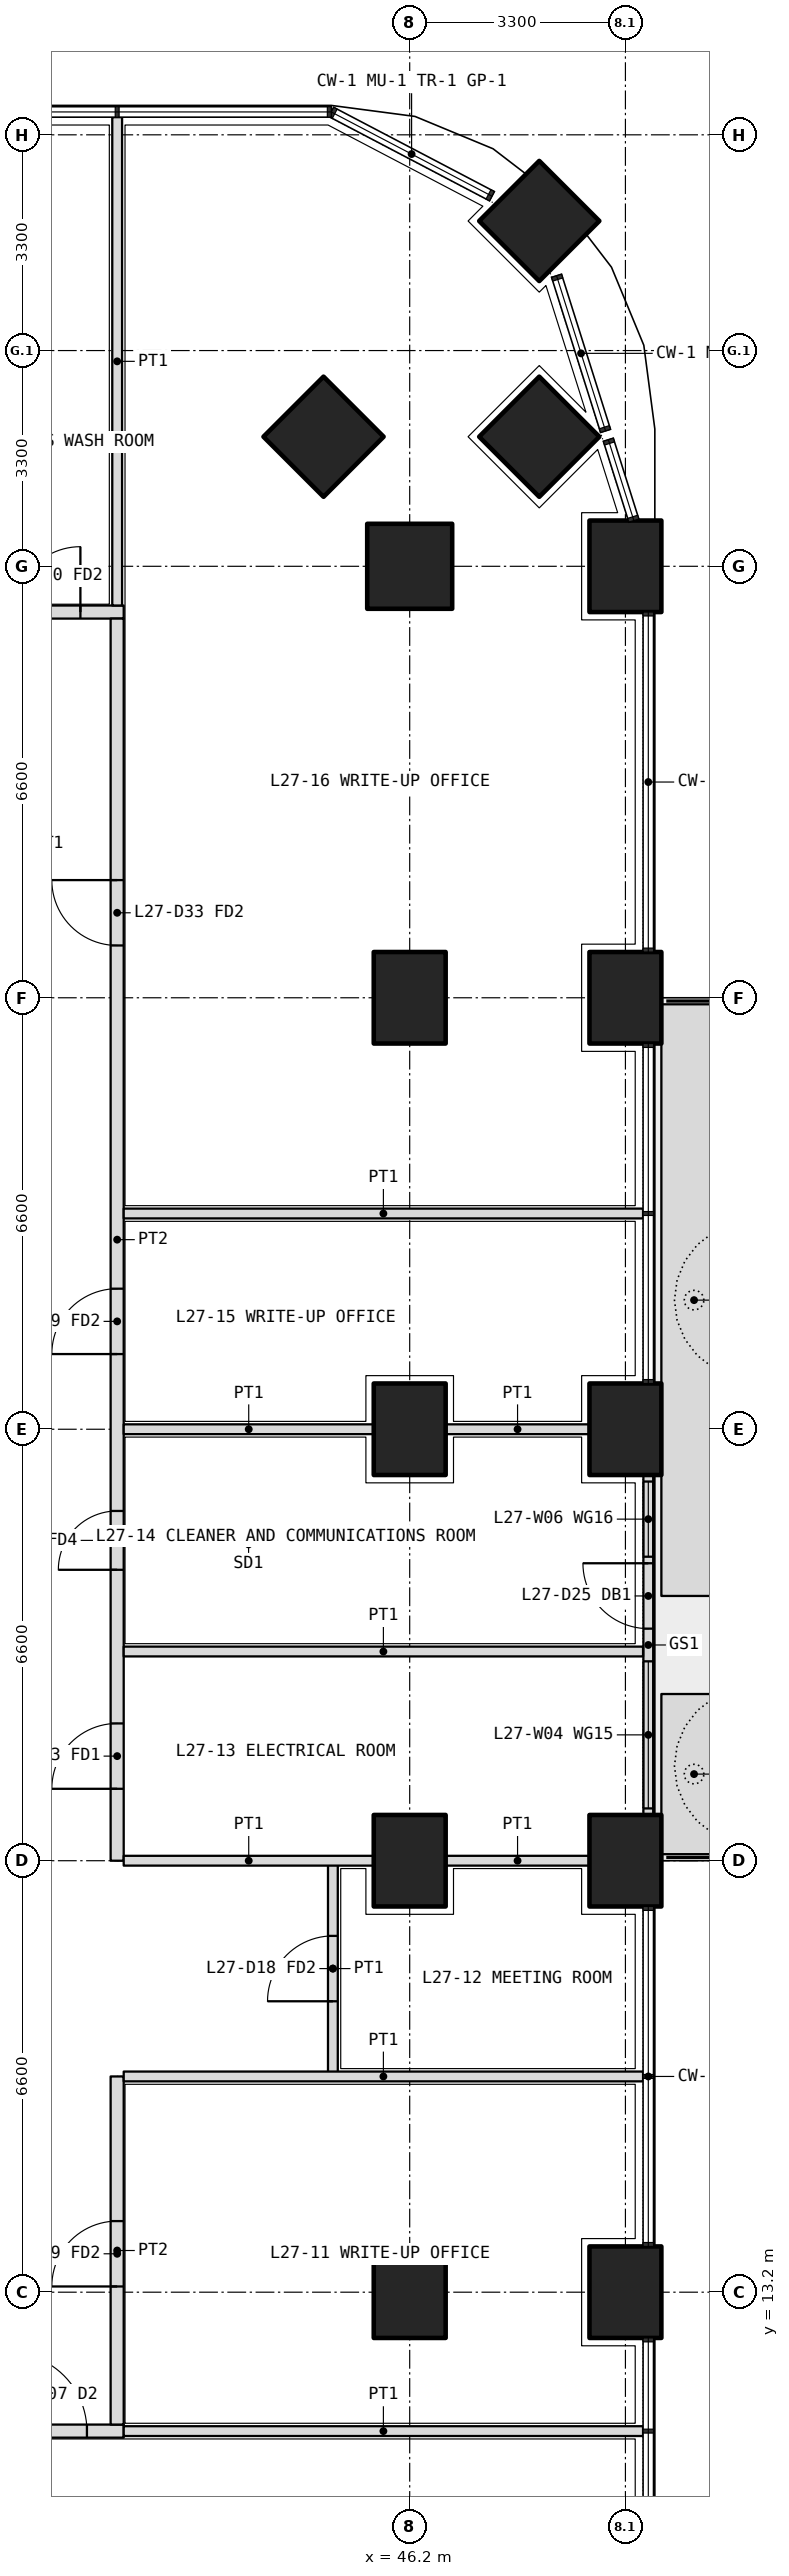
"""IFC4 building model, lengths in metres.
Left out: names, types, materials, properties, quantities, classifications, styles, units other than length and angle.
Written with IfcOpenShell. Run it as: python <this file> out.ifc"""

import sys

from ifc_helpers import new_model, si_unit, direction, frame, frame_2d, origin, origin_2d, place, context, subcontext, project, spatial, polyline, rectangle, outline, extrude, element, fill, save


model = new_model("IFC4")
c1 = context("Model", 3, precision=1e-05, world=origin(), true_north=direction((0.0, 1.0)))
c2 = subcontext(c1, "Body", "Model", "MODEL_VIEW")
j1 = project(units=[si_unit("LENGTHUNIT", "METRE"), si_unit("PLANEANGLEUNIT", "RADIAN")], contexts=[c1])
p1 = place(None, origin())
s1 = spatial("IfcSite", under=j1, at=p1, CompositionType="ELEMENT")
p2 = place(p1, origin())
s2 = spatial("IfcBuilding", under=s1, at=p2, CompositionType="ELEMENT")
p3 = place(p2, frame((0.0, 0.0, 120.0)))
s3 = spatial("IfcBuildingStorey", under=s2, at=p3, CompositionType="ELEMENT", Elevation=120.0)
p4 = place(p3, frame((48.182, 44.882, 0.0), z_axis=(0.0, 0.0, 1.0), x_axis=(0.707106781187, 0.707106781187, 0.0)))
e1 = element("IfcColumn", 1, at=p4, inside=s3, PredefinedType="COLUMN", context=c2, shape_type="SweptSolid", body=[
    extrude(rectangle(XDim=1.3, YDim=1.3, at=origin_2d()), origin(), (0.0, 0.0, 1.0), 4.2),
])
for number, where, z_axis, x_axis in (
    (2, (49.5, 13.2, 0.0), (0.0, 0.0, 1.0), (0.0, 1.0, 0.0)),
    (3, (49.5, 19.8, 0.0), (0.0, 0.0, 1.0), (0.0, 1.0, 0.0)),
    (4, (49.5, 26.4, 0.0), (0.0, 0.0, 1.0), (0.0, 1.0, 0.0)),
    (5, (49.5, 33.0, 0.0), (0.0, 0.0, 1.0), (0.0, 1.0, 0.0)),
    (6, (49.5, 39.6, 0.0), (0.0, 0.0, 1.0), (0.0, 1.0, 0.0)),
):
    element("IfcColumn", number, at=place(p3, frame(where, z_axis=z_axis, x_axis=x_axis)), inside=s3, PredefinedType="COLUMN", context=c2, shape_type="SweptSolid", body=[
        extrude(rectangle(XDim=1.4, YDim=1.1, at=origin_2d()), origin(), (0.0, 0.0, 1.0), 4.2),
    ])
for number, where, z_axis, x_axis in (
    (7, (46.2, 39.6, 0.0), (0.0, 0.0, 1.0), (1.0, 0.0, 0.0)),
    (8, (48.182, 41.582, 0.0), (0.0, 0.0, 1.0), (0.707, 0.707, 0.0)),
    (9, (44.882, 41.582, 0.0), (0.0, 0.0, 1.0), (0.707, 0.707, 0.0)),
):
    element("IfcColumn", number, at=place(p3, frame(where, z_axis=z_axis, x_axis=x_axis)), inside=s3, PredefinedType="COLUMN", context=c2, shape_type="SweptSolid", body=[
        extrude(rectangle(XDim=1.3, YDim=1.3, at=origin_2d()), origin(), (0.0, 0.0, 1.0), 4.2),
    ])
for number, where, z_axis, x_axis in (
    (10, (46.2, 13.2, 0.0), (0.0, 0.0, 1.0), (0.0, 1.0, 0.0)),
    (11, (46.2, 19.8, 0.0), (0.0, 0.0, 1.0), (0.0, 1.0, 0.0)),
    (12, (46.2, 26.4, 0.0), (0.0, 0.0, 1.0), (0.0, 1.0, 0.0)),
    (13, (46.2, 33.0, 0.0), (0.0, 0.0, 1.0), (0.0, 1.0, 0.0)),
):
    element("IfcColumn", number, at=place(p3, frame(where, z_axis=z_axis, x_axis=x_axis)), inside=s3, PredefinedType="COLUMN", context=c2, shape_type="SweptSolid", body=[
        extrude(rectangle(XDim=1.4, YDim=1.1, at=origin_2d()), origin(), (0.0, 0.0, 1.0), 4.2),
    ])
p5 = place(p3, origin())
e14 = element("IfcWall", 14, at=p5, inside=s3, PredefinedType="USERDEFINED", context=c2, shape_type="SweptSolid", body=[
    extrude(outline(polyline([(50.05, 19.9), (51.05, 19.9), (51.05, 22.35), (50.05, 22.35), (50.05, 19.9)]), holes=[polyline([(50.2, 20.05), (50.9, 20.05), (50.9, 22.2), (50.2, 22.2), (50.2, 20.05)])]), origin(), (0.0, 0.0, 1.0), 1.05),
])
p6 = place(p3, origin())
e15 = element("IfcWall", 15, at=p6, inside=s3, PredefinedType="USERDEFINED", context=c2, shape_type="SweptSolid", body=[
    extrude(outline(polyline([(50.05, 23.85), (51.05, 23.85), (51.05, 32.9), (50.05, 32.9), (50.05, 23.85)]), holes=[polyline([(50.2, 24.0), (50.9, 24.0), (50.9, 32.75), (50.2, 32.75), (50.2, 24.0)])]), origin(), (0.0, 0.0, 1.0), 1.05),
])
p7 = place(p3, frame((49.85, 20.5, 0.0), z_axis=(0.0, 0.0, 1.0), x_axis=(0.0, 1.0, 0.0)))
e16 = element("IfcWall", 16, at=p7, inside=s3, PredefinedType="SOLIDWALL", context=c2, shape_type="SweptSolid", body=[
    extrude(rectangle(XDim=5.2, YDim=0.15, at=frame_2d((2.6, 0.0))), origin(), (0.0, 0.0, 1.0), 2.7),
])
p8 = place(p7, frame((2.85, 0.0, 0.0)))
e17 = element("IfcOpeningElement", 17, at=p8, cuts=e16, PredefinedType="OPENING", context=c2, shape_type="SweptSolid", body=[
    extrude(rectangle(XDim=1.0, YDim=2.4, at=frame_2d((0.5, 1.2))), frame((0.0, 0.085, 0.0), z_axis=(0.0, -1.0, 0.0), x_axis=(1.0, 0.0, 0.0)), (0.0, 0.0, 1.0), 0.17),
])
p9 = place(p7, frame((0.1, 0.0, 0.1)))
e18 = element("IfcOpeningElement", 18, at=p9, cuts=e16, PredefinedType="OPENING", context=c2, shape_type="SweptSolid", body=[
    extrude(rectangle(XDim=2.25, YDim=2.3, at=frame_2d((1.125, 1.15))), frame((0.0, 0.085, 0.0), z_axis=(0.0, -1.0, 0.0), x_axis=(1.0, 0.0, 0.0)), (0.0, 0.0, 1.0), 0.17),
])
p10 = place(p7, frame((3.95, 0.0, 0.1)))
e19 = element("IfcOpeningElement", 19, at=p10, cuts=e16, PredefinedType="OPENING", context=c2, shape_type="SweptSolid", body=[
    extrude(rectangle(XDim=1.15, YDim=2.3, at=frame_2d((0.575, 1.15))), frame((0.0, 0.085, 0.0), z_axis=(0.0, -1.0, 0.0), x_axis=(1.0, 0.0, 0.0)), (0.0, 0.0, 1.0), 0.17),
])
p11 = place(p3, frame((10.975, 11.075, 0.0), z_axis=(0.0, 0.0, 1.0), x_axis=(1.0, 0.0, 0.0)))
e20 = element("IfcWall", 20, at=p11, inside=s3, PredefinedType="PARTITIONING", context=c2, shape_type="SweptSolid", body=[
    extrude(rectangle(XDim=30.85, YDim=0.2, at=frame_2d((15.425, 0.0))), origin(), (0.0, 0.0, 1.0), 2.85),
])
p12 = place(p11, frame((10.462, 0.0, 0.0)))
e21 = element("IfcOpeningElement", 21, at=p12, cuts=e20, PredefinedType="OPENING", context=c2, shape_type="SweptSolid", body=[
    extrude(rectangle(XDim=1.2, YDim=2.1, at=frame_2d((0.6, 1.05))), frame((0.0, 0.11, 0.0), z_axis=(0.0, -1.0, 0.0), x_axis=(1.0, 0.0, 0.0)), (0.0, 0.0, 1.0), 0.22),
])
p13 = place(p11, frame((23.625, 0.0, 0.0)))
e22 = element("IfcOpeningElement", 22, at=p13, cuts=e20, PredefinedType="OPENING", context=c2, shape_type="SweptSolid", body=[
    extrude(rectangle(XDim=1.0, YDim=2.1, at=frame_2d((0.5, 1.05))), frame((0.0, 0.11, 0.0), z_axis=(0.0, -1.0, 0.0), x_axis=(1.0, 0.0, 0.0)), (0.0, 0.0, 1.0), 0.22),
])
p14 = place(p11, frame((26.925, 0.0, 0.0)))
e23 = element("IfcOpeningElement", 23, at=p14, cuts=e20, PredefinedType="OPENING", context=c2, shape_type="SweptSolid", body=[
    extrude(rectangle(XDim=1.0, YDim=2.1, at=frame_2d((0.5, 1.05))), frame((0.0, 0.11, 0.0), z_axis=(0.0, -1.0, 0.0), x_axis=(1.0, 0.0, 0.0)), (0.0, 0.0, 1.0), 0.22),
])
p15 = place(p11, frame((29.087, 0.0, 0.0)))
e24 = element("IfcOpeningElement", 24, at=p15, cuts=e20, PredefinedType="OPENING", context=c2, shape_type="SweptSolid", body=[
    extrude(rectangle(XDim=1.2, YDim=2.1, at=frame_2d((0.6, 1.05))), frame((0.0, 0.11, 0.0), z_axis=(0.0, -1.0, 0.0), x_axis=(1.0, 0.0, 0.0)), (0.0, 0.0, 1.0), 0.22),
])
p16 = place(p3, frame((10.975, 38.9, 0.0), z_axis=(0.0, 0.0, 1.0), x_axis=(1.0, 0.0, 0.0)))
e25 = element("IfcWall", 25, at=p16, inside=s3, PredefinedType="PARTITIONING", context=c2, shape_type="SweptSolid", body=[
    extrude(rectangle(XDim=30.85, YDim=0.2, at=frame_2d((15.425, 0.0))), origin(), (0.0, 0.0, 1.0), 2.85),
])
p17 = place(p16, frame((12.113, 0.0, 0.0)))
e26 = element("IfcOpeningElement", 26, at=p17, cuts=e25, PredefinedType="OPENING", context=c2, shape_type="SweptSolid", body=[
    extrude(rectangle(XDim=1.2, YDim=2.1, at=frame_2d((0.6, 1.05))), frame((0.0, 0.11, 0.0), z_axis=(0.0, -1.0, 0.0), x_axis=(1.0, 0.0, 0.0)), (0.0, 0.0, 1.0), 0.22),
])
p18 = place(p16, frame((26.475, 0.0, 0.0)))
e27 = element("IfcOpeningElement", 27, at=p18, cuts=e25, PredefinedType="OPENING", context=c2, shape_type="SweptSolid", body=[
    extrude(rectangle(XDim=1.0, YDim=2.1, at=frame_2d((0.5, 1.05))), frame((0.0, 0.11, 0.0), z_axis=(0.0, -1.0, 0.0), x_axis=(1.0, 0.0, 0.0)), (0.0, 0.0, 1.0), 0.22),
])
p19 = place(p16, frame((29.188, 0.0, 0.0)))
e28 = element("IfcOpeningElement", 28, at=p19, cuts=e25, PredefinedType="OPENING", context=c2, shape_type="SweptSolid", body=[
    extrude(rectangle(XDim=1.0, YDim=2.1, at=frame_2d((0.5, 1.05))), frame((0.0, 0.11, 0.0), z_axis=(0.0, -1.0, 0.0), x_axis=(1.0, 0.0, 0.0)), (0.0, 0.0, 1.0), 0.22),
])
p20 = place(p3, frame((41.725, 11.175, 0.0), z_axis=(0.0, 0.0, 1.0), x_axis=(0.0, 1.0, 0.0)))
e29 = element("IfcWall", 29, at=p20, inside=s3, PredefinedType="PARTITIONING", context=c2, shape_type="SweptSolid", body=[
    extrude(rectangle(XDim=5.325, YDim=0.2, at=frame_2d((2.663, 0.0))), origin(), (0.0, 0.0, 1.0), 2.85),
])
p21 = place(p20, frame((2.113, 0.0, 0.0)))
e30 = element("IfcOpeningElement", 30, at=p21, cuts=e29, PredefinedType="OPENING", context=c2, shape_type="SweptSolid", body=[
    extrude(rectangle(XDim=1.0, YDim=2.1, at=frame_2d((0.5, 1.05))), frame((0.0, 0.11, 0.0), z_axis=(0.0, -1.0, 0.0), x_axis=(1.0, 0.0, 0.0)), (0.0, 0.0, 1.0), 0.22),
])
p22 = place(p3, frame((41.725, 19.8, 0.0), z_axis=(0.0, 0.0, 1.0), x_axis=(0.0, 1.0, 0.0)))
e31 = element("IfcWall", 31, at=p22, inside=s3, PredefinedType="PARTITIONING", context=c2, shape_type="SweptSolid", body=[
    extrude(rectangle(XDim=19.0, YDim=0.2, at=frame_2d((9.5, 0.0))), origin(), (0.0, 0.0, 1.0), 2.85),
])
p23 = place(p22, frame((1.1, 0.0, 0.0)))
e32 = element("IfcOpeningElement", 32, at=p23, cuts=e31, PredefinedType="OPENING", context=c2, shape_type="SweptSolid", body=[
    extrude(rectangle(XDim=1.0, YDim=2.1, at=frame_2d((0.5, 1.05))), frame((0.0, 0.11, 0.0), z_axis=(0.0, -1.0, 0.0), x_axis=(1.0, 0.0, 0.0)), (0.0, 0.0, 1.0), 0.22),
])
p24 = place(p22, frame((4.45, 0.0, 0.0)))
e33 = element("IfcOpeningElement", 33, at=p24, cuts=e31, PredefinedType="OPENING", context=c2, shape_type="SweptSolid", body=[
    extrude(rectangle(XDim=0.9, YDim=2.1, at=frame_2d((0.45, 1.05))), frame((0.0, 0.11, 0.0), z_axis=(0.0, -1.0, 0.0), x_axis=(1.0, 0.0, 0.0)), (0.0, 0.0, 1.0), 0.22),
])
p25 = place(p22, frame((7.75, 0.0, 0.0)))
e34 = element("IfcOpeningElement", 34, at=p25, cuts=e31, PredefinedType="OPENING", context=c2, shape_type="SweptSolid", body=[
    extrude(rectangle(XDim=1.0, YDim=2.1, at=frame_2d((0.5, 1.05))), frame((0.0, 0.11, 0.0), z_axis=(0.0, -1.0, 0.0), x_axis=(1.0, 0.0, 0.0)), (0.0, 0.0, 1.0), 0.22),
])
p26 = place(p22, frame((14.0, 0.0, 0.0)))
e35 = element("IfcOpeningElement", 35, at=p26, cuts=e31, PredefinedType="OPENING", context=c2, shape_type="SweptSolid", body=[
    extrude(rectangle(XDim=1.0, YDim=2.1, at=frame_2d((0.5, 1.05))), frame((0.0, 0.11, 0.0), z_axis=(0.0, -1.0, 0.0), x_axis=(1.0, 0.0, 0.0)), (0.0, 0.0, 1.0), 0.22),
])
p27 = place(p3, frame((49.77, 11.075, 0.0), z_axis=(0.0, 0.0, 1.0), x_axis=(-1.0, 0.0, 0.0)))
e36 = element("IfcWall", 36, at=p27, inside=s3, PredefinedType="PARTITIONING", context=c2, shape_type="SweptSolid", body=[
    extrude(rectangle(XDim=7.945, YDim=0.15, at=frame_2d((3.973, 0.0))), origin(), (0.0, 0.0, 1.0), 2.7),
])
p28 = place(p3, frame((41.725, 46.47, 0.0), z_axis=(0.0, 0.0, 1.0), x_axis=(0.0, -1.0, 0.0)))
e37 = element("IfcWall", 37, at=p28, inside=s3, PredefinedType="PARTITIONING", context=c2, shape_type="SweptSolid", body=[
    extrude(rectangle(XDim=7.47, YDim=0.15, at=frame_2d((3.735, 0.0))), origin(), (0.0, 0.0, 1.0), 2.7),
])
p29 = place(p3, frame((45.025, 16.5, 0.0), z_axis=(0.0, 0.0, 1.0), x_axis=(0.0, 1.0, 0.0)))
e38 = element("IfcWall", 38, at=p29, inside=s3, PredefinedType="PARTITIONING", context=c2, shape_type="SweptSolid", body=[
    extrude(rectangle(XDim=3.3, YDim=0.15, at=frame_2d((1.65, 0.0))), origin(), (0.0, 0.0, 1.0), 2.85),
])
p30 = place(p29, frame((1.15, 0.0, 0.0)))
e39 = element("IfcOpeningElement", 39, at=p30, cuts=e38, PredefinedType="OPENING", context=c2, shape_type="SweptSolid", body=[
    extrude(rectangle(XDim=1.0, YDim=2.1, at=frame_2d((0.5, 1.05))), frame((0.0, 0.085, 0.0), z_axis=(0.0, -1.0, 0.0), x_axis=(1.0, 0.0, 0.0)), (0.0, 0.0, 1.0), 0.17),
])
p31 = place(p3, frame((49.77, 23.0, 0.0), z_axis=(0.0, 0.0, 1.0), x_axis=(-1.0, 0.0, 0.0)))
e40 = element("IfcWall", 40, at=p31, inside=s3, PredefinedType="PARTITIONING", context=c2, shape_type="SweptSolid", body=[
    extrude(rectangle(XDim=7.945, YDim=0.15, at=frame_2d((3.973, 0.0))), origin(), (0.0, 0.0, 1.0), 2.7),
])
p32 = place(p3, frame((48.95, 26.4, 0.0), z_axis=(0.0, 0.0, 1.0), x_axis=(-1.0, 0.0, 0.0)))
e41 = element("IfcWall", 41, at=p32, inside=s3, PredefinedType="PARTITIONING", context=c2, shape_type="SweptSolid", body=[
    extrude(rectangle(XDim=2.2, YDim=0.15, at=frame_2d((1.1, 0.0))), origin(), (0.0, 0.0, 1.0), 2.85),
])
p33 = place(p3, frame((45.65, 26.4, 0.0), z_axis=(0.0, 0.0, 1.0), x_axis=(-1.0, 0.0, 0.0)))
e42 = element("IfcWall", 42, at=p33, inside=s3, PredefinedType="PARTITIONING", context=c2, shape_type="SweptSolid", body=[
    extrude(rectangle(XDim=3.825, YDim=0.15, at=frame_2d((1.913, 0.0))), origin(), (0.0, 0.0, 1.0), 2.85),
])
p34 = place(p3, frame((49.77, 16.5, 0.0), z_axis=(0.0, 0.0, 1.0), x_axis=(-1.0, 0.0, 0.0)))
e43 = element("IfcWall", 43, at=p34, inside=s3, PredefinedType="PARTITIONING", context=c2, shape_type="SweptSolid", body=[
    extrude(rectangle(XDim=7.945, YDim=0.15, at=frame_2d((3.973, 0.0))), origin(), (0.0, 0.0, 1.0), 2.7),
])
p35 = place(p3, frame((48.95, 19.8, 0.0), z_axis=(0.0, 0.0, 1.0), x_axis=(-1.0, 0.0, 0.0)))
e44 = element("IfcWall", 44, at=p35, inside=s3, PredefinedType="PARTITIONING", context=c2, shape_type="SweptSolid", body=[
    extrude(rectangle(XDim=2.2, YDim=0.15, at=frame_2d((1.1, 0.0))), origin(), (0.0, 0.0, 1.0), 2.85),
])
p36 = place(p3, frame((45.65, 19.8, 0.0), z_axis=(0.0, 0.0, 1.0), x_axis=(-1.0, 0.0, 0.0)))
e45 = element("IfcWall", 45, at=p36, inside=s3, PredefinedType="PARTITIONING", context=c2, shape_type="SweptSolid", body=[
    extrude(rectangle(XDim=3.825, YDim=0.15, at=frame_2d((1.913, 0.0))), origin(), (0.0, 0.0, 1.0), 2.85),
])
p37 = place(p3, frame((49.77, 29.7, 0.0), z_axis=(0.0, 0.0, 1.0), x_axis=(-1.0, 0.0, 0.0)))
e46 = element("IfcWall", 46, at=p37, inside=s3, PredefinedType="PARTITIONING", context=c2, shape_type="SweptSolid", body=[
    extrude(rectangle(XDim=7.945, YDim=0.15, at=frame_2d((3.973, 0.0))), origin(), (0.0, 0.0, 1.0), 2.7),
])
p38 = place(p8, origin())
e47 = element("IfcDoor", 47, at=p38, inside=s3, OperationType="SINGLE_SWING_RIGHT", PredefinedType="DOOR", context=c2, shape_type="SweptSolid", body=[
    extrude(rectangle(XDim=1.0, YDim=2.4, at=frame_2d((0.5, 1.2))), frame((0.0, 0.025, 0.0), z_axis=(0.0, -1.0, 0.0), x_axis=(1.0, 0.0, 0.0)), (0.0, 0.0, 1.0), 0.05),
])
fill(e17, e47)
p39 = place(p9, origin())
e48 = element("IfcWindow", 48, at=p39, inside=s3, PartitioningType="SINGLE_PANEL", PredefinedType="WINDOW", context=c2, shape_type="SweptSolid", body=[
    extrude(rectangle(XDim=2.25, YDim=2.3, at=frame_2d((1.125, 1.15))), frame((0.0, 0.03, 0.0), z_axis=(0.0, -1.0, 0.0), x_axis=(1.0, 0.0, 0.0)), (0.0, 0.0, 1.0), 0.06),
])
fill(e18, e48)
p40 = place(p10, origin())
e49 = element("IfcWindow", 49, at=p40, inside=s3, PartitioningType="SINGLE_PANEL", PredefinedType="WINDOW", context=c2, shape_type="SweptSolid", body=[
    extrude(rectangle(XDim=1.15, YDim=2.3, at=frame_2d((0.575, 1.15))), frame((0.0, 0.03, 0.0), z_axis=(0.0, -1.0, 0.0), x_axis=(1.0, 0.0, 0.0)), (0.0, 0.0, 1.0), 0.06),
])
fill(e19, e49)
p41 = place(p15, origin())
e50 = element("IfcDoor", 50, at=p41, inside=s3, OperationType="DOUBLE_DOOR_SINGLE_SWING", PredefinedType="DOOR", context=c2, shape_type="SweptSolid", body=[
    extrude(rectangle(XDim=1.2, YDim=2.1, at=frame_2d((0.6, 1.05))), frame((0.0, 0.025, 0.0), z_axis=(0.0, -1.0, 0.0), x_axis=(1.0, 0.0, 0.0)), (0.0, 0.0, 1.0), 0.05),
])
fill(e24, e50)
p42 = place(p21, origin())
e51 = element("IfcDoor", 51, at=p42, inside=s3, OperationType="SINGLE_SWING_LEFT", PredefinedType="DOOR", context=c2, shape_type="SweptSolid", body=[
    extrude(rectangle(XDim=1.0, YDim=2.1, at=frame_2d((0.5, 1.05))), frame((0.0, 0.025, 0.0), z_axis=(0.0, -1.0, 0.0), x_axis=(1.0, 0.0, 0.0)), (0.0, 0.0, 1.0), 0.05),
])
fill(e30, e51)
p43 = place(p30, origin())
e52 = element("IfcDoor", 52, at=p43, inside=s3, OperationType="SINGLE_SWING_LEFT", PredefinedType="DOOR", context=c2, shape_type="SweptSolid", body=[
    extrude(rectangle(XDim=1.0, YDim=2.1, at=frame_2d((0.5, 1.05))), frame((0.0, 0.025, 0.0), z_axis=(0.0, -1.0, 0.0), x_axis=(1.0, 0.0, 0.0)), (0.0, 0.0, 1.0), 0.05),
])
fill(e39, e52)
p44 = place(p23, origin())
e53 = element("IfcDoor", 53, at=p44, inside=s3, OperationType="SINGLE_SWING_LEFT", PredefinedType="DOOR", context=c2, shape_type="SweptSolid", body=[
    extrude(rectangle(XDim=1.0, YDim=2.1, at=frame_2d((0.5, 1.05))), frame((0.0, 0.025, 0.0), z_axis=(0.0, -1.0, 0.0), x_axis=(1.0, 0.0, 0.0)), (0.0, 0.0, 1.0), 0.05),
])
fill(e32, e53)
p45 = place(p24, origin())
e54 = element("IfcDoor", 54, at=p45, inside=s3, OperationType="SINGLE_SWING_LEFT", PredefinedType="DOOR", context=c2, shape_type="SweptSolid", body=[
    extrude(rectangle(XDim=0.9, YDim=2.1, at=frame_2d((0.45, 1.05))), frame((0.0, 0.025, 0.0), z_axis=(0.0, -1.0, 0.0), x_axis=(1.0, 0.0, 0.0)), (0.0, 0.0, 1.0), 0.05),
])
fill(e33, e54)
p46 = place(p25, origin())
e55 = element("IfcDoor", 55, at=p46, inside=s3, OperationType="SINGLE_SWING_LEFT", PredefinedType="DOOR", context=c2, shape_type="SweptSolid", body=[
    extrude(rectangle(XDim=1.0, YDim=2.1, at=frame_2d((0.5, 1.05))), frame((0.0, 0.025, 0.0), z_axis=(0.0, -1.0, 0.0), x_axis=(1.0, 0.0, 0.0)), (0.0, 0.0, 1.0), 0.05),
])
fill(e34, e55)
p47 = place(p26, origin())
e56 = element("IfcDoor", 56, at=p47, inside=s3, OperationType="SINGLE_SWING_RIGHT", PredefinedType="DOOR", context=c2, shape_type="SweptSolid", body=[
    extrude(rectangle(XDim=1.0, YDim=2.1, at=frame_2d((0.5, 1.05))), frame((0.0, 0.025, 0.0), z_axis=(0.0, -1.0, 0.0), x_axis=(1.0, 0.0, 0.0)), (0.0, 0.0, 1.0), 0.05),
])
fill(e35, e56)
p48 = place(p19, origin())
e57 = element("IfcDoor", 57, at=p48, inside=s3, OperationType="SINGLE_SWING_RIGHT", PredefinedType="DOOR", context=c2, shape_type="SweptSolid", body=[
    extrude(rectangle(XDim=1.0, YDim=2.1, at=frame_2d((0.5, 1.05))), frame((0.0, 0.025, 0.0), z_axis=(0.0, -1.0, 0.0), x_axis=(1.0, 0.0, 0.0)), (0.0, 0.0, 1.0), 0.05),
])
fill(e28, e57)
save(model, sys.argv[1])
